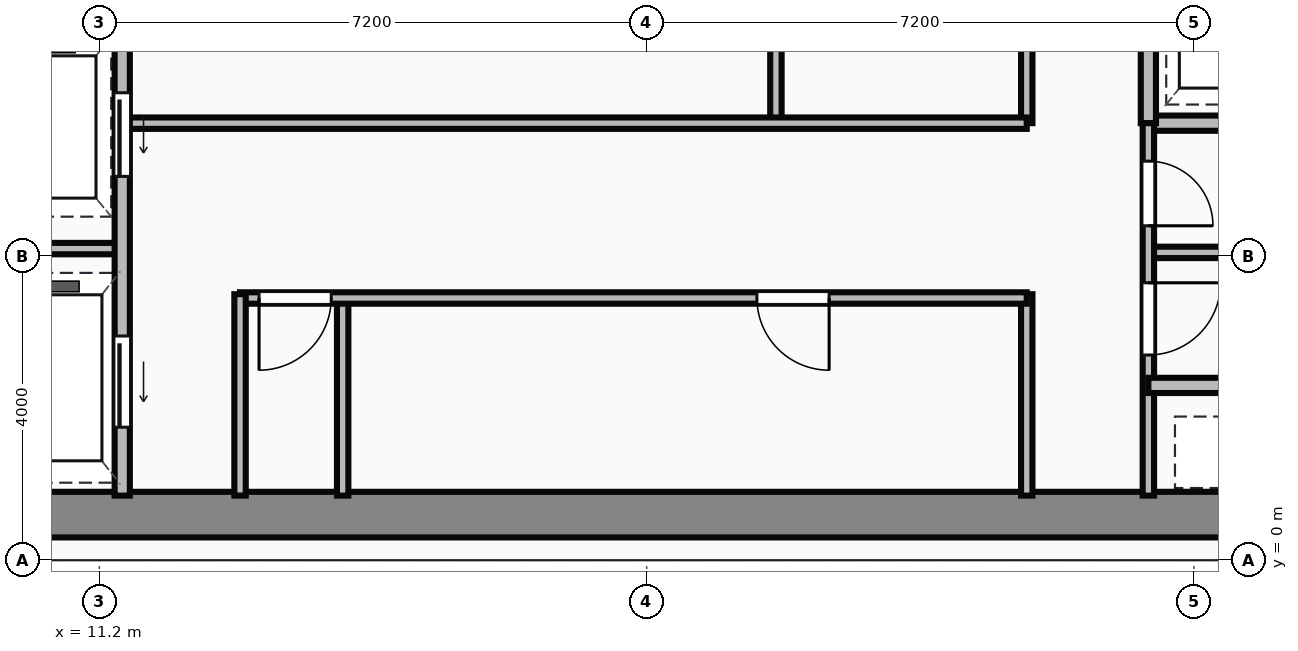
"""IFC4 building model, lengths in metres.
Left out: names, types, materials, properties, quantities, classifications, styles, units other than length and angle.
Written with IfcOpenShell. Run it as: python <this file> out.ifc"""

import sys

from ifc_helpers import new_model, si_unit, direction, frame, frame_2d, origin, place, context, subcontext, project, spatial, rectangle, extrude, source, transform, mapped, element, fill, save


model = new_model("IFC4")
c1 = context("Model", 3, precision=1e-05, world=origin(), true_north=direction((0.0, 1.0)))
c2 = subcontext(c1, "Body", "Model", "MODEL_VIEW")
j1 = project(units=[si_unit("LENGTHUNIT", "METRE"), si_unit("PLANEANGLEUNIT", "RADIAN")], contexts=[c1])
p1 = place(None, origin())
s1 = spatial("IfcSite", under=j1, at=p1, CompositionType="ELEMENT")
p2 = place(p1, origin())
s2 = spatial("IfcBuilding", under=s1, at=p2, CompositionType="ELEMENT")
p3 = place(p2, frame((0.0, 0.0, 225.1)))
s3 = spatial("IfcBuildingStorey", under=s2, at=p3, CompositionType="ELEMENT", Elevation=225.1)
m1 = source(origin(), c2, "Body", "SweptSolid", [
    extrude(rectangle(XDim=29.5, YDim=0.6, at=frame_2d((14.75, 0.0))), origin(), (0.0, 0.0, 1.0), 3.65),
])
p4 = place(p3, frame((4.5, 0.6, 0.0), z_axis=(0.0, 0.0, 1.0), x_axis=(1.0, 0.0, 0.0)))
e1 = element("IfcWall", 1, at=p4, inside=s3, PredefinedType="SHEAR", context=c2, shape_type="MappedRepresentation", body=[
    mapped(m1, transform((0.0, 0.0, 0.0))),
])
m2 = source(origin(), c2, "Body", "SweptSolid", [
    extrude(rectangle(XDim=9.6, YDim=0.2, at=frame_2d((4.8, 0.0))), origin(), (0.0, 0.0, 1.0), 3.4),
])
p5 = place(p3, frame((11.5, 0.85, 0.0), z_axis=(0.0, 0.0, 1.0), x_axis=(0.0, 1.0, 0.0)))
e2 = element("IfcWall", 2, at=p5, inside=s3, PredefinedType="PARTITIONING", context=c2, shape_type="MappedRepresentation", body=[
    mapped(m2, transform((0.0, 0.0, 0.0))),
])
p6 = place(p5, frame((4.2, 0.0, 0.0)))
e3 = element("IfcOpeningElement", 3, at=p6, cuts=e2, PredefinedType="OPENING", context=c2, shape_type="SweptSolid", body=[
    extrude(rectangle(XDim=1.1, YDim=2.15, at=frame_2d((0.55, 1.075))), frame((0.0, 0.11, 0.0), z_axis=(0.0, -1.0, 0.0), x_axis=(1.0, 0.0, 0.0)), (0.0, 0.0, 1.0), 0.22),
])
p7 = place(p5, frame((0.9, 0.0, 0.0)))
e4 = element("IfcOpeningElement", 4, at=p7, cuts=e2, PredefinedType="OPENING", context=c2, shape_type="SweptSolid", body=[
    extrude(rectangle(XDim=1.2, YDim=2.15, at=frame_2d((0.6, 1.075))), frame((0.0, 0.11, 0.0), z_axis=(0.0, -1.0, 0.0), x_axis=(1.0, 0.0, 0.0)), (0.0, 0.0, 1.0), 0.22),
])
m3 = source(origin(), c2, "Body", "SweptSolid", [
    extrude(rectangle(XDim=2.4, YDim=0.15, at=frame_2d((1.2, 0.0))), origin(), (0.0, 0.0, 1.0), 3.4),
])
p8 = place(p3, frame((9.1, 4.1, 0.0), z_axis=(0.0, 0.0, 1.0), x_axis=(1.0, 0.0, 0.0)))
e5 = element("IfcWall", 5, at=p8, inside=s3, PredefinedType="PARTITIONING", context=c2, shape_type="MappedRepresentation", body=[
    mapped(m3, transform((0.0, 0.0, 0.0))),
])
m4 = source(origin(), c2, "Body", "SweptSolid", [
    extrude(rectangle(XDim=2.65, YDim=0.15, at=frame_2d((1.325, 0.0))), origin(), (0.0, 0.0, 1.0), 3.4),
])
p9 = place(p3, frame((13.05, 0.85, 0.0), z_axis=(0.0, 0.0, 1.0), x_axis=(0.0, 1.0, 0.0)))
e6 = element("IfcWall", 6, at=p9, inside=s3, PredefinedType="PARTITIONING", context=c2, shape_type="MappedRepresentation", body=[
    mapped(m4, transform((0.0, 0.0, 0.0))),
])
m5 = source(origin(), c2, "Body", "SweptSolid", [
    extrude(rectangle(XDim=10.35, YDim=0.15, at=frame_2d((5.175, 0.0))), origin(), (0.0, 0.0, 1.0), 3.4),
])
p10 = place(p3, frame((13.05, 3.45, 0.0), z_axis=(0.0, 0.0, 1.0), x_axis=(1.0, 0.0, 0.0)))
e7 = element("IfcWall", 7, at=p10, inside=s3, PredefinedType="PARTITIONING", context=c2, shape_type="MappedRepresentation", body=[
    mapped(m5, transform((0.0, 0.0, 0.0))),
])
p11 = place(p10, frame((0.25, 0.0, 0.0)))
e8 = element("IfcOpeningElement", 8, at=p11, cuts=e7, PredefinedType="OPENING", context=c2, shape_type="SweptSolid", body=[
    extrude(rectangle(XDim=0.95, YDim=2.15, at=frame_2d((0.475, 1.075))), frame((0.0, 0.085, 0.0), z_axis=(0.0, -1.0, 0.0), x_axis=(1.0, 0.0, 0.0)), (0.0, 0.0, 1.0), 0.17),
])
p12 = place(p10, frame((6.8, 0.0, 0.0)))
e9 = element("IfcOpeningElement", 9, at=p12, cuts=e7, PredefinedType="OPENING", context=c2, shape_type="SweptSolid", body=[
    extrude(rectangle(XDim=0.95, YDim=2.15, at=frame_2d((0.475, 1.075))), frame((0.0, 0.085, 0.0), z_axis=(0.0, -1.0, 0.0), x_axis=(1.0, 0.0, 0.0)), (0.0, 0.0, 1.0), 0.17),
])
p13 = place(p3, frame((23.4, 0.85, 0.0), z_axis=(0.0, 0.0, 1.0), x_axis=(0.0, 1.0, 0.0)))
e10 = element("IfcWall", 10, at=p13, inside=s3, PredefinedType="PARTITIONING", context=c2, shape_type="MappedRepresentation", body=[
    mapped(m4, transform((0.0, 0.0, 0.0))),
])
m6 = source(origin(), c2, "Body", "SweptSolid", [
    extrude(rectangle(XDim=2.6, YDim=0.15, at=frame_2d((1.3, 0.0))), origin(), (0.0, 0.0, 1.0), 3.4),
])
p14 = place(p3, frame((14.4, 0.85, 0.0), z_axis=(0.0, 0.0, 1.0), x_axis=(0.0, 1.0, 0.0)))
e11 = element("IfcWall", 11, at=p14, inside=s3, PredefinedType="PARTITIONING", context=c2, shape_type="MappedRepresentation", body=[
    mapped(m6, transform((0.0, 0.0, 0.0))),
])
m7 = source(origin(), c2, "Body", "SweptSolid", [
    extrude(rectangle(XDim=11.85, YDim=0.15, at=frame_2d((5.925, 0.0))), origin(), (0.0, 0.0, 1.0), 3.4),
])
p15 = place(p3, frame((11.55, 5.75, 0.0), z_axis=(0.0, 0.0, 1.0), x_axis=(1.0, 0.0, 0.0)))
e12 = element("IfcWall", 12, at=p15, inside=s3, PredefinedType="PARTITIONING", context=c2, shape_type="MappedRepresentation", body=[
    mapped(m7, transform((0.0, 0.0, 0.0))),
])
m8 = source(origin(), c2, "Body", "SweptSolid", [
    extrude(rectangle(XDim=2.6, YDim=0.15, at=frame_2d((1.3, 0.0))), origin(), (0.0, 0.0, 1.0), 3.4),
])
p16 = place(p3, frame((23.4, 5.75, 0.0), z_axis=(0.0, 0.0, 1.0), x_axis=(0.0, 1.0, 0.0)))
e13 = element("IfcWall", 13, at=p16, inside=s3, PredefinedType="PARTITIONING", context=c2, shape_type="MappedRepresentation", body=[
    mapped(m8, transform((0.0, 0.0, 0.0))),
])
m9 = source(origin(), c2, "Body", "SweptSolid", [
    extrude(rectangle(XDim=2.5, YDim=0.15, at=frame_2d((1.25, 0.0))), origin(), (0.0, 0.0, 1.0), 3.4),
])
p17 = place(p3, frame((20.1, 5.8, 0.0), z_axis=(0.0, 0.0, 1.0), x_axis=(0.0, 1.0, 0.0)))
e14 = element("IfcWall", 14, at=p17, inside=s3, PredefinedType="PARTITIONING", context=c2, shape_type="MappedRepresentation", body=[
    mapped(m9, transform((0.0, 0.0, 0.0))),
])
m10 = source(origin(), c2, "Body", "SweptSolid", [
    extrude(rectangle(XDim=4.55, YDim=0.2, at=frame_2d((2.275, 0.0))), origin(), (0.0, 0.0, 1.0), 3.4),
])
p18 = place(p3, frame((25.0, 5.75, 0.0), z_axis=(0.0, 0.0, 1.0), x_axis=(1.0, 0.0, 0.0)))
e15 = element("IfcWall", 15, at=p18, inside=s3, PredefinedType="PARTITIONING", context=c2, shape_type="MappedRepresentation", body=[
    mapped(m10, transform((0.0, 0.0, 0.0))),
])
m11 = source(origin(), c2, "Body", "SweptSolid", [
    extrude(rectangle(XDim=2.6, YDim=0.2, at=frame_2d((1.3, 0.0))), origin(), (0.0, 0.0, 1.0), 3.4),
])
p19 = place(p3, frame((25.0, 5.75, 0.0), z_axis=(0.0, 0.0, 1.0), x_axis=(0.0, 1.0, 0.0)))
e16 = element("IfcWall", 16, at=p19, inside=s3, PredefinedType="PARTITIONING", context=c2, shape_type="MappedRepresentation", body=[
    mapped(m11, transform((0.0, 0.0, 0.0))),
])
m12 = source(origin(), c2, "Body", "SweptSolid", [
    extrude(rectangle(XDim=4.9, YDim=0.15, at=frame_2d((2.45, 0.0))), origin(), (0.0, 0.0, 1.0), 3.4),
])
p20 = place(p3, frame((25.0, 0.85, 0.0), z_axis=(0.0, 0.0, 1.0), x_axis=(0.0, 1.0, 0.0)))
e17 = element("IfcWall", 17, at=p20, inside=s3, PredefinedType="PARTITIONING", context=c2, shape_type="MappedRepresentation", body=[
    mapped(m12, transform((0.0, 0.0, 0.0))),
])
p21 = place(p20, frame((1.85, 0.0, 0.0)))
e18 = element("IfcOpeningElement", 18, at=p21, cuts=e17, PredefinedType="OPENING", context=c2, shape_type="SweptSolid", body=[
    extrude(rectangle(XDim=0.95, YDim=2.15, at=frame_2d((0.475, 1.075))), frame((0.0, 0.085, 0.0), z_axis=(0.0, -1.0, 0.0), x_axis=(1.0, 0.0, 0.0)), (0.0, 0.0, 1.0), 0.17),
])
p22 = place(p20, frame((3.55, 0.0, 0.0)))
e19 = element("IfcOpeningElement", 19, at=p22, cuts=e17, PredefinedType="OPENING", context=c2, shape_type="SweptSolid", body=[
    extrude(rectangle(XDim=0.85, YDim=2.15, at=frame_2d((0.425, 1.075))), frame((0.0, 0.085, 0.0), z_axis=(0.0, -1.0, 0.0), x_axis=(1.0, 0.0, 0.0)), (0.0, 0.0, 1.0), 0.17),
])
m13 = source(origin(), c2, "Body", "SweptSolid", [
    extrude(rectangle(XDim=2.4, YDim=0.2, at=frame_2d((1.2, 0.0))), origin(), (0.0, 0.0, 1.0), 3.4),
])
p23 = place(p3, frame((25.0, 2.3, 0.0), z_axis=(0.0, 0.0, 1.0), x_axis=(1.0, 0.0, 0.0)))
e20 = element("IfcWall", 20, at=p23, inside=s3, PredefinedType="PARTITIONING", context=c2, shape_type="MappedRepresentation", body=[
    mapped(m13, transform((0.0, 0.0, 0.0))),
])
m14 = source(origin(), c2, "Body", "SweptSolid", [
    extrude(rectangle(XDim=4.55, YDim=0.15, at=frame_2d((2.275, 0.0))), origin(), (0.0, 0.0, 1.0), 3.4),
])
p24 = place(p3, frame((25.0, 4.05, 0.0), z_axis=(0.0, 0.0, 1.0), x_axis=(1.0, 0.0, 0.0)))
e21 = element("IfcWall", 21, at=p24, inside=s3, PredefinedType="PARTITIONING", context=c2, shape_type="MappedRepresentation", body=[
    mapped(m14, transform((0.0, 0.0, 0.0))),
])
m15 = source(origin(), c2, "Body", "SweptSolid", [
    extrude(rectangle(XDim=1.1, YDim=2.15, at=frame_2d((0.55, 1.075))), frame((0.0, 0.025, 0.0), z_axis=(0.0, -1.0, 0.0), x_axis=(1.0, 0.0, 0.0)), (0.0, 0.0, 1.0), 0.05),
])
p25 = place(p6, frame((1.1, 0.0, 0.0), z_axis=(0.0, 0.0, 1.0), x_axis=(-1.0, 0.0, 0.0)))
e22 = element("IfcDoor", 22, at=p25, inside=s3, OperationType="SLIDING_TO_LEFT", PredefinedType="DOOR", context=c2, shape_type="MappedRepresentation", body=[
    mapped(m15, transform((0.0, 0.0, 0.0))),
])
fill(e3, e22)
m16 = source(origin(), c2, "Body", "SweptSolid", [
    extrude(rectangle(XDim=1.2, YDim=2.15, at=frame_2d((0.6, 1.075))), frame((0.0, 0.025, 0.0), z_axis=(0.0, -1.0, 0.0), x_axis=(1.0, 0.0, 0.0)), (0.0, 0.0, 1.0), 0.05),
])
p26 = place(p7, frame((1.2, 0.0, 0.0), z_axis=(0.0, 0.0, 1.0), x_axis=(-1.0, 0.0, 0.0)))
e23 = element("IfcDoor", 23, at=p26, inside=s3, OperationType="SLIDING_TO_LEFT", PredefinedType="DOOR", context=c2, shape_type="MappedRepresentation", body=[
    mapped(m16, transform((0.0, 0.0, 0.0))),
])
fill(e4, e23)
m17 = source(origin(), c2, "Body", "SweptSolid", [
    extrude(rectangle(XDim=0.95, YDim=2.15, at=frame_2d((0.475, 1.075))), frame((0.0, 0.025, 0.0), z_axis=(0.0, -1.0, 0.0), x_axis=(1.0, 0.0, 0.0)), (0.0, 0.0, 1.0), 0.05),
])
p27 = place(p11, origin())
e24 = element("IfcDoor", 24, at=p27, inside=s3, OperationType="SINGLE_SWING_LEFT", PredefinedType="DOOR", context=c2, shape_type="MappedRepresentation", body=[
    mapped(m17, transform((0.0, 0.0, 0.0))),
])
fill(e8, e24)
p28 = place(p12, origin())
e25 = element("IfcDoor", 25, at=p28, inside=s3, OperationType="SINGLE_SWING_RIGHT", PredefinedType="DOOR", context=c2, shape_type="MappedRepresentation", body=[
    mapped(m17, transform((0.0, 0.0, 0.0))),
])
fill(e9, e25)
p29 = place(p21, origin())
e26 = element("IfcDoor", 26, at=p29, inside=s3, OperationType="SINGLE_SWING_RIGHT", PredefinedType="DOOR", context=c2, shape_type="MappedRepresentation", body=[
    mapped(m17, transform((0.0, 0.0, 0.0))),
])
fill(e18, e26)
m18 = source(origin(), c2, "Body", "SweptSolid", [
    extrude(rectangle(XDim=0.85, YDim=2.15, at=frame_2d((0.425, 1.075))), frame((0.0, 0.025, 0.0), z_axis=(0.0, -1.0, 0.0), x_axis=(1.0, 0.0, 0.0)), (0.0, 0.0, 1.0), 0.05),
])
p30 = place(p22, origin())
e27 = element("IfcDoor", 27, at=p30, inside=s3, OperationType="SINGLE_SWING_LEFT", PredefinedType="DOOR", context=c2, shape_type="MappedRepresentation", body=[
    mapped(m18, transform((0.0, 0.0, 0.0))),
])
fill(e19, e27)
save(model, sys.argv[1])
